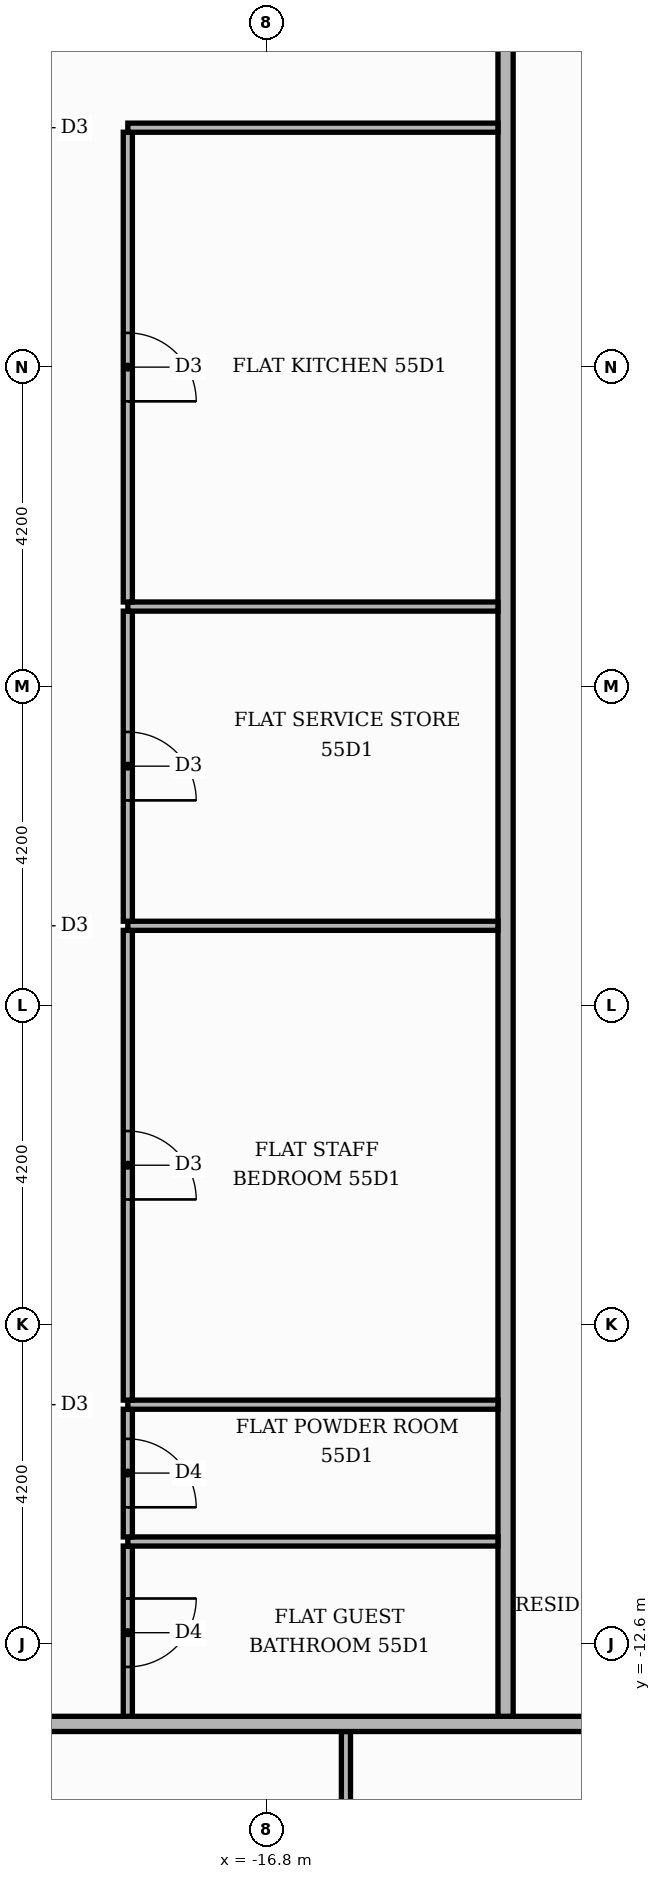
"""IFC4 building model, lengths in metres.
Left out: names, types, materials, properties, quantities, classifications, styles, units other than length and angle.
Written with IfcOpenShell. Run it as: python <this file> out.ifc"""

import sys

from ifc_helpers import new_model, si_unit, direction, frame, frame_2d, origin, place, context, subcontext, project, spatial, rectangle, extrude, element, fill, save


model = new_model("IFC4")
c1 = context("Model", 3, precision=1e-05, world=origin(), true_north=direction((0.0, 1.0)))
c2 = subcontext(c1, "Body", "Model", "MODEL_VIEW")
j1 = project(units=[si_unit("LENGTHUNIT", "METRE"), si_unit("PLANEANGLEUNIT", "RADIAN")], contexts=[c1])
p1 = place(None, origin())
s1 = spatial("IfcSite", under=j1, at=p1, CompositionType="ELEMENT")
p2 = place(p1, origin())
s2 = spatial("IfcBuilding", under=s1, at=p2, CompositionType="ELEMENT")
p3 = place(p2, frame((0.0, 0.0, 231.3)))
s3 = spatial("IfcBuildingStorey", under=s2, at=p3, CompositionType="ELEMENT", Elevation=231.3)
p4 = place(p3, frame((-15.75, -20.36, 0.0), z_axis=(0.0, 0.0, 1.0), x_axis=(0.0, 1.0, 0.0)))
e1 = element("IfcWall", 1, at=p4, inside=s3, PredefinedType="PARTITIONING", context=c2, shape_type="SweptSolid", body=[
    extrude(rectangle(XDim=6.61, YDim=0.12, at=frame_2d((3.305, 0.0))), origin(), (0.0, 0.0, 1.0), 3.4),
])
p5 = place(p4, frame((2.825, 0.0, 0.0)))
e2 = element("IfcOpeningElement", 2, at=p5, cuts=e1, PredefinedType="OPENING", context=c2, shape_type="SweptSolid", body=[
    extrude(rectangle(XDim=1.0, YDim=2.1, at=frame_2d((0.5, 1.05))), frame((0.0, 0.07, 0.0), z_axis=(0.0, -1.0, 0.0), x_axis=(1.0, 0.0, 0.0)), (0.0, 0.0, 1.0), 0.14),
])
p6 = place(p3, frame((-25.42, -13.65, 0.0), z_axis=(0.0, 0.0, 1.0), x_axis=(1.0, 0.0, 0.0)))
e3 = element("IfcWall", 3, at=p6, inside=s3, PredefinedType="PARTITIONING", context=c2, shape_type="SweptSolid", body=[
    extrude(rectangle(XDim=39.07, YDim=0.2, at=frame_2d((19.535, 0.0))), origin(), (0.0, 0.0, 1.0), 3.4),
])
p7 = place(p6, frame((13.32, 0.0, 0.0)))
e4 = element("IfcOpeningElement", 4, at=p7, cuts=e3, PredefinedType="OPENING", context=c2, shape_type="SweptSolid", body=[
    extrude(rectangle(XDim=1.1, YDim=2.4, at=frame_2d((0.55, 1.2))), frame((0.0, 0.11, 0.0), z_axis=(0.0, -1.0, 0.0), x_axis=(1.0, 0.0, 0.0)), (0.0, 0.0, 1.0), 0.22),
])
p8 = place(p6, frame((21.72, 0.0, 0.0)))
e5 = element("IfcOpeningElement", 5, at=p8, cuts=e3, PredefinedType="OPENING", context=c2, shape_type="SweptSolid", body=[
    extrude(rectangle(XDim=1.1, YDim=2.4, at=frame_2d((0.55, 1.2))), frame((0.0, 0.11, 0.0), z_axis=(0.0, -1.0, 0.0), x_axis=(1.0, 0.0, 0.0)), (0.0, 0.0, 1.0), 0.22),
])
p9 = place(p3, frame((-18.62, -13.55, 0.0), z_axis=(0.0, 0.0, 1.0), x_axis=(0.0, 1.0, 0.0)))
e6 = element("IfcWall", 6, at=p9, inside=s3, PredefinedType="PARTITIONING", context=c2, shape_type="SweptSolid", body=[
    extrude(rectangle(XDim=2.24, YDim=0.12, at=frame_2d((1.12, 0.0))), origin(), (0.0, 0.0, 1.0), 3.4),
])
p10 = place(p9, frame((0.65, 0.0, 0.0)))
e7 = element("IfcOpeningElement", 7, at=p10, cuts=e6, PredefinedType="OPENING", context=c2, shape_type="SweptSolid", body=[
    extrude(rectangle(XDim=0.9, YDim=2.1, at=frame_2d((0.45, 1.05))), frame((0.0, 0.07, 0.0), z_axis=(0.0, -1.0, 0.0), x_axis=(1.0, 0.0, 0.0)), (0.0, 0.0, 1.0), 0.14),
])
p11 = place(p3, frame((-13.65, -13.55, 0.0), z_axis=(0.0, 0.0, 1.0), x_axis=(0.0, 1.0, 0.0)))
e8 = element("IfcWall", 8, at=p11, inside=s3, PredefinedType="PARTITIONING", context=c2, shape_type="SweptSolid", body=[
    extrude(rectangle(XDim=27.1, YDim=0.2, at=frame_2d((13.55, 0.0))), origin(), (0.0, 0.0, 1.0), 3.4),
])
p12 = place(p11, frame((23.5, 0.0, 0.0)))
e9 = element("IfcOpeningElement", 9, at=p12, cuts=e8, PredefinedType="OPENING", context=c2, shape_type="SweptSolid", body=[
    extrude(rectangle(XDim=1.1, YDim=2.4, at=frame_2d((0.55, 1.2))), frame((0.0, 0.11, 0.0), z_axis=(0.0, -1.0, 0.0), x_axis=(1.0, 0.0, 0.0)), (0.0, 0.0, 1.0), 0.22),
])
p13 = place(p3, frame((-18.62, -11.25, 0.0), z_axis=(0.0, 0.0, 1.0), x_axis=(1.0, 0.0, 0.0)))
e10 = element("IfcWall", 10, at=p13, inside=s3, PredefinedType="PARTITIONING", context=c2, shape_type="SweptSolid", body=[
    extrude(rectangle(XDim=4.87, YDim=0.12, at=frame_2d((2.435, 0.0))), origin(), (0.0, 0.0, 1.0), 3.4),
])
p14 = place(p3, frame((-18.62, -11.19, 0.0), z_axis=(0.0, 0.0, 1.0), x_axis=(0.0, 1.0, 0.0)))
e11 = element("IfcWall", 11, at=p14, inside=s3, PredefinedType="PARTITIONING", context=c2, shape_type="SweptSolid", body=[
    extrude(rectangle(XDim=1.68, YDim=0.12, at=frame_2d((0.84, 0.0))), origin(), (0.0, 0.0, 1.0), 3.4),
])
p15 = place(p14, frame((0.39, 0.0, 0.0)))
e12 = element("IfcOpeningElement", 12, at=p15, cuts=e11, PredefinedType="OPENING", context=c2, shape_type="SweptSolid", body=[
    extrude(rectangle(XDim=0.9, YDim=2.1, at=frame_2d((0.45, 1.05))), frame((0.0, 0.07, 0.0), z_axis=(0.0, -1.0, 0.0), x_axis=(1.0, 0.0, 0.0)), (0.0, 0.0, 1.0), 0.14),
])
p16 = place(p3, frame((-18.62, -9.45, 0.0), z_axis=(0.0, 0.0, 1.0), x_axis=(1.0, 0.0, 0.0)))
e13 = element("IfcWall", 13, at=p16, inside=s3, PredefinedType="PARTITIONING", context=c2, shape_type="SweptSolid", body=[
    extrude(rectangle(XDim=4.87, YDim=0.12, at=frame_2d((2.435, 0.0))), origin(), (0.0, 0.0, 1.0), 3.4),
])
p17 = place(p3, frame((-18.62, -9.39, 0.0), z_axis=(0.0, 0.0, 1.0), x_axis=(0.0, 1.0, 0.0)))
e14 = element("IfcWall", 14, at=p17, inside=s3, PredefinedType="PARTITIONING", context=c2, shape_type="SweptSolid", body=[
    extrude(rectangle(XDim=6.18, YDim=0.12, at=frame_2d((3.09, 0.0))), origin(), (0.0, 0.0, 1.0), 3.4),
])
p18 = place(p17, frame((2.64, 0.0, 0.0)))
e15 = element("IfcOpeningElement", 15, at=p18, cuts=e14, PredefinedType="OPENING", context=c2, shape_type="SweptSolid", body=[
    extrude(rectangle(XDim=0.9, YDim=2.1, at=frame_2d((0.45, 1.05))), frame((0.0, 0.07, 0.0), z_axis=(0.0, -1.0, 0.0), x_axis=(1.0, 0.0, 0.0)), (0.0, 0.0, 1.0), 0.14),
])
p19 = place(p3, frame((-18.62, -3.15, 0.0), z_axis=(0.0, 0.0, 1.0), x_axis=(1.0, 0.0, 0.0)))
e16 = element("IfcWall", 16, at=p19, inside=s3, PredefinedType="PARTITIONING", context=c2, shape_type="SweptSolid", body=[
    extrude(rectangle(XDim=4.87, YDim=0.12, at=frame_2d((2.435, 0.0))), origin(), (0.0, 0.0, 1.0), 3.4),
])
p20 = place(p3, frame((-18.62, -3.09, 0.0), z_axis=(0.0, 0.0, 1.0), x_axis=(0.0, 1.0, 0.0)))
e17 = element("IfcWall", 17, at=p20, inside=s3, PredefinedType="PARTITIONING", context=c2, shape_type="SweptSolid", body=[
    extrude(rectangle(XDim=4.08, YDim=0.12, at=frame_2d((2.04, 0.0))), origin(), (0.0, 0.0, 1.0), 3.4),
])
p21 = place(p20, frame((1.59, 0.0, 0.0)))
e18 = element("IfcOpeningElement", 18, at=p21, cuts=e17, PredefinedType="OPENING", context=c2, shape_type="SweptSolid", body=[
    extrude(rectangle(XDim=0.9, YDim=2.1, at=frame_2d((0.45, 1.05))), frame((0.0, 0.07, 0.0), z_axis=(0.0, -1.0, 0.0), x_axis=(1.0, 0.0, 0.0)), (0.0, 0.0, 1.0), 0.14),
])
p22 = place(p3, frame((-18.62, 1.05, 0.0), z_axis=(0.0, 0.0, 1.0), x_axis=(1.0, 0.0, 0.0)))
e19 = element("IfcWall", 19, at=p22, inside=s3, PredefinedType="PARTITIONING", context=c2, shape_type="SweptSolid", body=[
    extrude(rectangle(XDim=4.87, YDim=0.12, at=frame_2d((2.435, 0.0))), origin(), (0.0, 0.0, 1.0), 3.4),
])
p23 = place(p3, frame((-18.62, 1.11, 0.0), z_axis=(0.0, 0.0, 1.0), x_axis=(0.0, 1.0, 0.0)))
e20 = element("IfcWall", 20, at=p23, inside=s3, PredefinedType="PARTITIONING", context=c2, shape_type="SweptSolid", body=[
    extrude(rectangle(XDim=6.18, YDim=0.12, at=frame_2d((3.09, 0.0))), origin(), (0.0, 0.0, 1.0), 3.4),
])
p24 = place(p23, frame((2.64, 0.0, 0.0)))
e21 = element("IfcOpeningElement", 21, at=p24, cuts=e20, PredefinedType="OPENING", context=c2, shape_type="SweptSolid", body=[
    extrude(rectangle(XDim=0.9, YDim=2.1, at=frame_2d((0.45, 1.05))), frame((0.0, 0.07, 0.0), z_axis=(0.0, -1.0, 0.0), x_axis=(1.0, 0.0, 0.0)), (0.0, 0.0, 1.0), 0.14),
])
p25 = place(p3, frame((-18.62, 7.35, 0.0), z_axis=(0.0, 0.0, 1.0), x_axis=(1.0, 0.0, 0.0)))
e22 = element("IfcWall", 22, at=p25, inside=s3, PredefinedType="PARTITIONING", context=c2, shape_type="SweptSolid", body=[
    extrude(rectangle(XDim=4.87, YDim=0.12, at=frame_2d((2.435, 0.0))), origin(), (0.0, 0.0, 1.0), 3.4),
])
p26 = place(p24, frame((0.9, 0.0, 0.0), z_axis=(0.0, 0.0, 1.0), x_axis=(-1.0, 0.0, 0.0)))
e23 = element("IfcDoor", 23, at=p26, inside=s3, OperationType="SINGLE_SWING_LEFT", PredefinedType="DOOR", context=c2, shape_type="SweptSolid", body=[
    extrude(rectangle(XDim=0.9, YDim=2.1, at=frame_2d((0.45, 1.05))), frame((0.0, 0.025, 0.0), z_axis=(0.0, -1.0, 0.0), x_axis=(1.0, 0.0, 0.0)), (0.0, 0.0, 1.0), 0.05),
])
fill(e21, e23)
p27 = place(p21, frame((0.9, 0.0, 0.0), z_axis=(0.0, 0.0, 1.0), x_axis=(-1.0, 0.0, 0.0)))
e24 = element("IfcDoor", 24, at=p27, inside=s3, OperationType="SINGLE_SWING_LEFT", PredefinedType="DOOR", context=c2, shape_type="SweptSolid", body=[
    extrude(rectangle(XDim=0.9, YDim=2.1, at=frame_2d((0.45, 1.05))), frame((0.0, 0.025, 0.0), z_axis=(0.0, -1.0, 0.0), x_axis=(1.0, 0.0, 0.0)), (0.0, 0.0, 1.0), 0.05),
])
fill(e18, e24)
p28 = place(p18, frame((0.9, 0.0, 0.0), z_axis=(0.0, 0.0, 1.0), x_axis=(-1.0, 0.0, 0.0)))
e25 = element("IfcDoor", 25, at=p28, inside=s3, OperationType="SINGLE_SWING_LEFT", PredefinedType="DOOR", context=c2, shape_type="SweptSolid", body=[
    extrude(rectangle(XDim=0.9, YDim=2.1, at=frame_2d((0.45, 1.05))), frame((0.0, 0.025, 0.0), z_axis=(0.0, -1.0, 0.0), x_axis=(1.0, 0.0, 0.0)), (0.0, 0.0, 1.0), 0.05),
])
fill(e15, e25)
p29 = place(p15, frame((0.9, 0.0, 0.0), z_axis=(0.0, 0.0, 1.0), x_axis=(-1.0, 0.0, 0.0)))
e26 = element("IfcDoor", 26, at=p29, inside=s3, OperationType="SINGLE_SWING_LEFT", PredefinedType="DOOR", context=c2, shape_type="SweptSolid", body=[
    extrude(rectangle(XDim=0.9, YDim=2.1, at=frame_2d((0.45, 1.05))), frame((0.0, 0.025, 0.0), z_axis=(0.0, -1.0, 0.0), x_axis=(1.0, 0.0, 0.0)), (0.0, 0.0, 1.0), 0.05),
])
fill(e12, e26)
p30 = place(p10, frame((0.9, 0.0, 0.0), z_axis=(0.0, 0.0, 1.0), x_axis=(-1.0, 0.0, 0.0)))
e27 = element("IfcDoor", 27, at=p30, inside=s3, OperationType="SINGLE_SWING_RIGHT", PredefinedType="DOOR", context=c2, shape_type="SweptSolid", body=[
    extrude(rectangle(XDim=0.9, YDim=2.1, at=frame_2d((0.45, 1.05))), frame((0.0, 0.025, 0.0), z_axis=(0.0, -1.0, 0.0), x_axis=(1.0, 0.0, 0.0)), (0.0, 0.0, 1.0), 0.05),
])
fill(e7, e27)
save(model, sys.argv[1])
